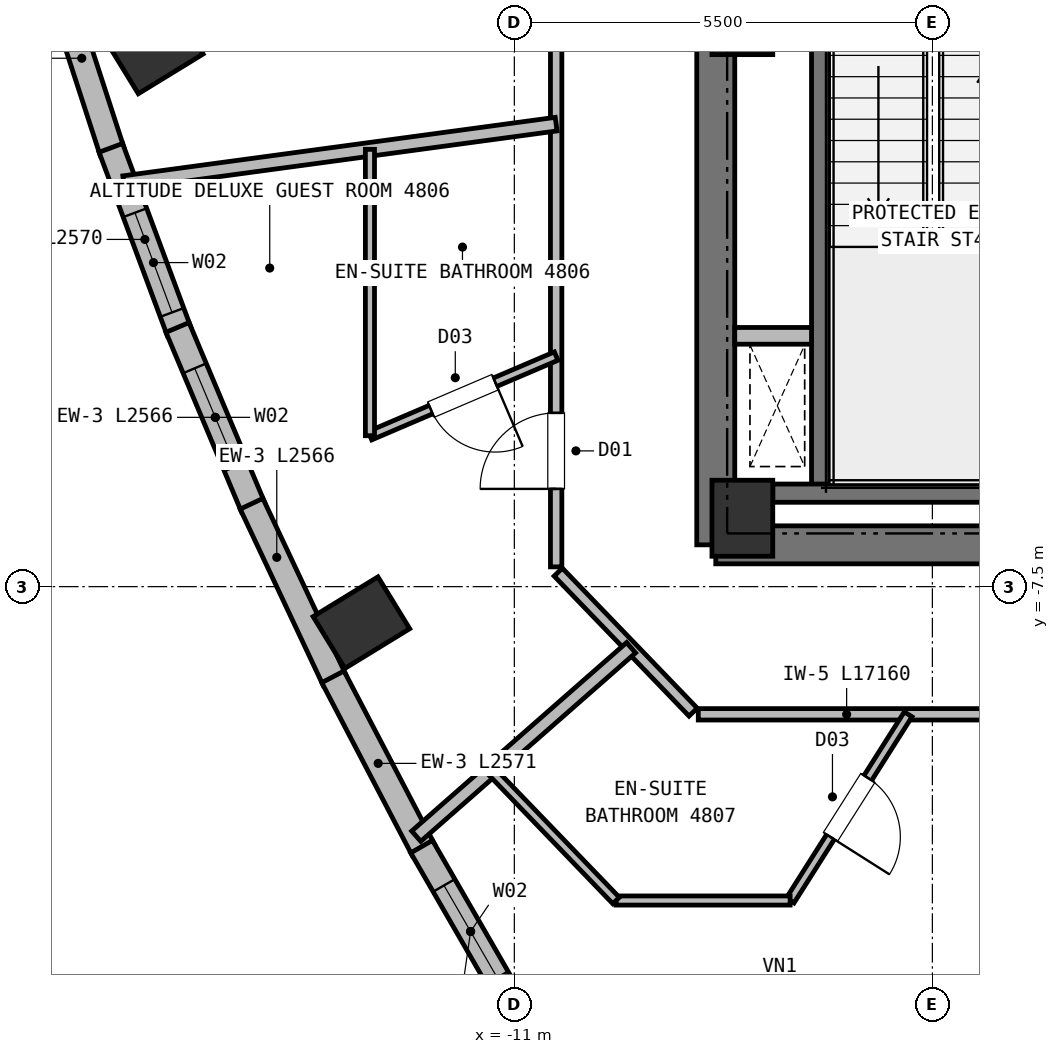
"""IFC4 building model, lengths in metres.
Left out: names, types, materials, properties, quantities, classifications, styles, units other than length and angle.
Written with IfcOpenShell. Run it as: python <this file> out.ifc"""

import sys

from ifc_helpers import new_model, si_unit, direction, frame, frame_2d, origin, origin_2d, place, context, subcontext, project, spatial, rectangle, extrude, element, fill, save


model = new_model("IFC4")
c1 = context("Model", 3, precision=1e-05, world=origin(), true_north=direction((0.0, 1.0)))
c2 = subcontext(c1, "Body", "Model", "MODEL_VIEW")
j1 = project(units=[si_unit("LENGTHUNIT", "METRE"), si_unit("PLANEANGLEUNIT", "RADIAN")], contexts=[c1])
p1 = place(None, origin())
s1 = spatial("IfcSite", under=j1, at=p1, CompositionType="ELEMENT")
p2 = place(p1, origin())
s2 = spatial("IfcBuilding", under=s1, at=p2, CompositionType="ELEMENT")
p3 = place(p2, frame((0.0, 0.0, 182.75)))
s3 = spatial("IfcBuildingStorey", under=s2, at=p3, CompositionType="ELEMENT", Elevation=182.75)
for number, where, z_axis, x_axis in (
    (1, (-8.0, -6.6, 0.0), (0.0, 0.0, 1.0), (1.0, 0.0, 0.0)),
    (2, (-8.0, 0.0, 0.0), (0.0, 0.0, 1.0), (1.0, 0.0, 0.0)),
):
    element("IfcColumn", number, at=place(p3, frame(where, z_axis=z_axis, x_axis=x_axis)), inside=s3, PredefinedType="COLUMN", context=c2, shape_type="SweptSolid", body=[
        extrude(rectangle(XDim=0.8, YDim=1.0, at=origin_2d()), origin(), (0.0, 0.0, 1.0), 3.8),
    ])
p4 = place(p3, frame((-8.35, -6.95, 0.0), z_axis=(0.0, 0.0, 1.0), x_axis=(1.0, 0.0, 0.0)))
e3 = element("IfcWall", 3, at=p4, inside=s3, PredefinedType="SHEAR", context=c2, shape_type="SweptSolid", body=[
    extrude(rectangle(XDim=3.95, YDim=0.5, at=frame_2d((1.975, 0.0))), origin(), (0.0, 0.0, 1.0), 3.55),
])
p5 = place(p3, frame((-8.35, -6.95, 0.0), z_axis=(0.0, 0.0, 1.0), x_axis=(0.0, 1.0, 0.0)))
e4 = element("IfcWall", 4, at=p5, inside=s3, PredefinedType="SHEAR", context=c2, shape_type="SweptSolid", body=[
    extrude(rectangle(XDim=8.1, YDim=0.5, at=frame_2d((4.05, 0.0))), origin(), (0.0, 0.0, 1.0), 3.55),
])
for number, where, z_axis, x_axis in (
    (5, (-15.73, -0.412, 0.0), (0.0, 0.0, 1.0), (-0.522, 0.853, 0.0)),
    (6, (-13.012, -7.974, 0.0), (0.0, 0.0, 1.0), (-0.522, 0.853, 0.0)),
):
    element("IfcColumn", number, at=place(p3, frame(where, z_axis=z_axis, x_axis=x_axis)), inside=s3, PredefinedType="COLUMN", context=c2, shape_type="SweptSolid", body=[
        extrude(rectangle(XDim=0.8, YDim=1.0, at=origin_2d()), origin(), (0.0, 0.0, 1.0), 3.8),
    ])
p6 = place(p3, frame((-16.293, -1.774, 0.0), z_axis=(0.0, 0.0, 1.0), x_axis=(-0.309148141518, 0.951013894008, 0.0)))
e7 = element("IfcWall", 7, at=p6, inside=s3, PredefinedType="SOLIDWALL", context=c2, shape_type="SweptSolid", body=[
    extrude(rectangle(XDim=2.579, YDim=0.33, at=frame_2d((1.29, 0.0))), origin(), (0.0, 0.0, 1.0), 3.55),
])
p7 = place(p3, frame((-15.413, -4.136, 0.0), z_axis=(0.0, 0.0, 1.0), x_axis=(-0.348582368666, 0.937278150954, 0.0)))
e8 = element("IfcWall", 8, at=p7, inside=s3, PredefinedType="SOLIDWALL", context=c2, shape_type="SweptSolid", body=[
    extrude(rectangle(XDim=2.57, YDim=0.33, at=frame_2d((1.285, 0.0))), origin(), (0.0, 0.0, 1.0), 3.55),
])
p8 = place(p7, frame((0.26, 0.0, 0.72)))
e9 = element("IfcOpeningElement", 9, at=p8, cuts=e8, PredefinedType="OPENING", context=c2, shape_type="SweptSolid", body=[
    extrude(rectangle(XDim=1.4, YDim=1.84, at=frame_2d((0.7, 0.92))), frame((0.0, 0.175, 0.0), z_axis=(0.0, -1.0, 0.0), x_axis=(1.0, 0.0, 0.0)), (0.0, 0.0, 1.0), 0.35),
])
p9 = place(p3, frame((-14.437, -6.455, 0.0), z_axis=(0.0, 0.0, 1.0), x_axis=(-0.387525243304, 0.921859092162, 0.0)))
e10 = element("IfcWall", 10, at=p9, inside=s3, PredefinedType="SOLIDWALL", context=c2, shape_type="SweptSolid", body=[
    extrude(rectangle(XDim=2.566, YDim=0.33, at=frame_2d((1.283, 0.0))), origin(), (0.0, 0.0, 1.0), 3.55),
])
p10 = place(p9, frame((0.583, 0.0, 0.72)))
e11 = element("IfcOpeningElement", 11, at=p10, cuts=e10, PredefinedType="OPENING", context=c2, shape_type="SweptSolid", body=[
    extrude(rectangle(XDim=1.4, YDim=1.84, at=frame_2d((0.7, 0.92))), frame((0.0, 0.175, 0.0), z_axis=(0.0, -1.0, 0.0), x_axis=(1.0, 0.0, 0.0)), (0.0, 0.0, 1.0), 0.35),
])
p11 = place(p3, frame((-13.365, -8.731, 0.0), z_axis=(0.0, 0.0, 1.0), x_axis=(-0.425774125911, 0.90482948322, 0.0)))
e12 = element("IfcWall", 12, at=p11, inside=s3, PredefinedType="SOLIDWALL", context=c2, shape_type="SweptSolid", body=[
    extrude(rectangle(XDim=2.566, YDim=0.33, at=frame_2d((1.283, 0.0))), origin(), (0.0, 0.0, 1.0), 3.55),
])
p12 = place(p3, frame((-12.196, -10.965, 0.0), z_axis=(0.0, 0.0, 1.0), x_axis=(-0.463361004434, 0.886169611062, 0.0)))
e13 = element("IfcWall", 13, at=p12, inside=s3, PredefinedType="SOLIDWALL", context=c2, shape_type="SweptSolid", body=[
    extrude(rectangle(XDim=2.571, YDim=0.33, at=frame_2d((1.285, 0.0))), origin(), (0.0, 0.0, 1.0), 3.55),
])
p13 = place(p3, frame((-10.931, -13.155, 0.0), z_axis=(0.0, 0.0, 1.0), x_axis=(-0.499875407217, 0.866097325513, 0.0)))
e14 = element("IfcWall", 14, at=p13, inside=s3, PredefinedType="SOLIDWALL", context=c2, shape_type="SweptSolid", body=[
    extrude(rectangle(XDim=2.579, YDim=0.33, at=frame_2d((1.29, 0.0))), origin(), (0.0, 0.0, 1.0), 3.55),
])
p14 = place(p13, frame((0.59, 0.0, 0.72)))
e15 = element("IfcOpeningElement", 15, at=p14, cuts=e14, PredefinedType="OPENING", context=c2, shape_type="SweptSolid", body=[
    extrude(rectangle(XDim=1.4, YDim=1.84, at=frame_2d((0.7, 0.92))), frame((0.0, 0.175, 0.0), z_axis=(0.0, -1.0, 0.0), x_axis=(1.0, 0.0, 0.0)), (0.0, 0.0, 1.0), 0.35),
])
p15 = place(p3, frame((-6.97, -6.16, 0.0), z_axis=(0.0, 0.0, 1.0), x_axis=(0.0, 1.0, 0.0)))
e16 = element("IfcWall", 16, at=p15, inside=s3, PredefinedType="SHEAR", context=c2, shape_type="SweptSolid", body=[
    extrude(rectangle(XDim=7.22, YDim=0.24, at=frame_2d((3.61, 0.0))), origin(), (0.0, 0.0, 1.0), 3.55),
])
p16 = place(p3, frame((-7.6, -6.27, 0.0), z_axis=(0.0, 0.0, 1.0), x_axis=(1.0, 0.0, 0.0)))
e17 = element("IfcWall", 17, at=p16, inside=s3, PredefinedType="SHEAR", context=c2, shape_type="SweptSolid", body=[
    extrude(rectangle(XDim=3.59, YDim=0.24, at=frame_2d((1.795, 0.0))), origin(), (0.0, 0.0, 1.0), 3.55),
])
p17 = place(p3, frame((-8.1, -4.2, 0.0), z_axis=(0.0, 0.0, 1.0), x_axis=(1.0, 0.0, 0.0)))
e18 = element("IfcWall", 18, at=p17, inside=s3, PredefinedType="PARTITIONING", context=c2, shape_type="SweptSolid", body=[
    extrude(rectangle(XDim=1.01, YDim=0.22, at=frame_2d((0.505, 0.0))), origin(), (0.0, 0.0, 1.0), 3.55),
])
p18 = place(p3, frame((8.58, -9.18, 0.0), z_axis=(0.0, 0.0, 1.0), x_axis=(-1.0, 0.0, 0.0)))
e19 = element("IfcWall", 19, at=p18, inside=s3, PredefinedType="PARTITIONING", context=c2, shape_type="SweptSolid", body=[
    extrude(rectangle(XDim=17.16, YDim=0.15, at=frame_2d((8.58, 0.0))), origin(), (0.0, 0.0, 1.0), 3.23),
])
p19 = place(p18, frame((2.444, 0.0, 0.0)))
e20 = element("IfcOpeningElement", 20, at=p19, cuts=e19, PredefinedType="OPENING", context=c2, shape_type="SweptSolid", body=[
    extrude(rectangle(XDim=0.95, YDim=2.1, at=frame_2d((0.475, 1.05))), frame((0.0, 0.085, 0.0), z_axis=(0.0, -1.0, 0.0), x_axis=(1.0, 0.0, 0.0)), (0.0, 0.0, 1.0), 0.17),
])
p20 = place(p18, frame((4.798, 0.0, 0.0)))
e21 = element("IfcOpeningElement", 21, at=p20, cuts=e19, PredefinedType="OPENING", context=c2, shape_type="SweptSolid", body=[
    extrude(rectangle(XDim=1.0, YDim=2.15, at=frame_2d((0.5, 1.075))), frame((0.0, 0.085, 0.0), z_axis=(0.0, -1.0, 0.0), x_axis=(1.0, 0.0, 0.0)), (0.0, 0.0, 1.0), 0.17),
])
p21 = place(p18, frame((12.096, 0.0, 0.0)))
e22 = element("IfcOpeningElement", 22, at=p21, cuts=e19, PredefinedType="OPENING", context=c2, shape_type="SweptSolid", body=[
    extrude(rectangle(XDim=1.06, YDim=2.15, at=frame_2d((0.53, 1.075))), frame((0.0, 0.085, 0.0), z_axis=(0.0, -1.0, 0.0), x_axis=(1.0, 0.0, 0.0)), (0.0, 0.0, 1.0), 0.17),
])
p22 = place(p18, frame((8.137, 0.0, 0.0)))
e23 = element("IfcOpeningElement", 23, at=p22, cuts=e19, PredefinedType="OPENING", context=c2, shape_type="SweptSolid", body=[
    extrude(rectangle(XDim=1.0, YDim=2.15, at=frame_2d((0.5, 1.075))), frame((0.0, 0.085, 0.0), z_axis=(0.0, -1.0, 0.0), x_axis=(1.0, 0.0, 0.0)), (0.0, 0.0, 1.0), 0.17),
])
p23 = place(p3, frame((-10.45, -7.24, 0.0), z_axis=(0.0, 0.0, 1.0), x_axis=(0.0, 1.0, 0.0)))
e24 = element("IfcWall", 24, at=p23, inside=s3, PredefinedType="PARTITIONING", context=c2, shape_type="SweptSolid", body=[
    extrude(rectangle(XDim=14.48, YDim=0.15, at=frame_2d((7.24, 0.0))), origin(), (0.0, 0.0, 1.0), 3.55),
])
p24 = place(p23, frame((1.026, 0.0, 0.0)))
e25 = element("IfcOpeningElement", 25, at=p24, cuts=e24, PredefinedType="OPENING", context=c2, shape_type="SweptSolid", body=[
    extrude(rectangle(XDim=1.0, YDim=2.15, at=frame_2d((0.5, 1.075))), frame((0.0, 0.085, 0.0), z_axis=(0.0, -1.0, 0.0), x_axis=(1.0, 0.0, 0.0)), (0.0, 0.0, 1.0), 0.17),
])
p25 = place(p23, frame((7.126, 0.0, 0.0)))
e26 = element("IfcOpeningElement", 26, at=p25, cuts=e24, PredefinedType="OPENING", context=c2, shape_type="SweptSolid", body=[
    extrude(rectangle(XDim=1.06, YDim=2.15, at=frame_2d((0.53, 1.075))), frame((0.0, 0.085, 0.0), z_axis=(0.0, -1.0, 0.0), x_axis=(1.0, 0.0, 0.0)), (0.0, 0.0, 1.0), 0.17),
])
p26 = place(p3, frame((-8.648, -9.151, 0.0), z_axis=(0.0, 0.0, 1.0), x_axis=(-0.693764562202, 0.720201869085, 0.0)))
e27 = element("IfcWall", 27, at=p26, inside=s3, PredefinedType="PARTITIONING", context=c2, shape_type="SweptSolid", body=[
    extrude(rectangle(XDim=2.558, YDim=0.15, at=frame_2d((1.279, 0.0))), origin(), (0.0, 0.0, 1.0), 3.23),
])
p27 = place(p3, frame((-10.45, -1.415, 0.0), z_axis=(0.0, 0.0, 1.0), x_axis=(-0.990963730959, -0.13413010074, 0.0)))
e28 = element("IfcWall", 28, at=p27, inside=s3, PredefinedType="PARTITIONING", context=c2, shape_type="SweptSolid", body=[
    extrude(rectangle(XDim=5.741, YDim=0.18, at=frame_2d((2.87, 0.0))), origin(), (0.0, 0.0, 1.0), 3.55),
])
p28 = place(p3, frame((-10.45, -4.467, 0.0), z_axis=(0.0, 0.0, 1.0), x_axis=(-0.919533231313, -0.39301226, 0.0)))
e29 = element("IfcWall", 29, at=p28, inside=s3, PredefinedType="PARTITIONING", context=c2, shape_type="SweptSolid", body=[
    extrude(rectangle(XDim=2.664, YDim=0.12, at=frame_2d((1.332, 0.0))), origin(), (0.0, 0.0, 1.0), 3.55),
])
p29 = place(p28, frame((0.872, 0.0, 0.0)))
e30 = element("IfcOpeningElement", 30, at=p29, cuts=e29, PredefinedType="OPENING", context=c2, shape_type="SweptSolid", body=[
    extrude(rectangle(XDim=0.92, YDim=2.1, at=frame_2d((0.46, 1.05))), frame((0.0, 0.07, 0.0), z_axis=(0.0, -1.0, 0.0), x_axis=(1.0, 0.0, 0.0)), (0.0, 0.0, 1.0), 0.14),
])
p30 = place(p3, frame((-12.9, -1.746, 0.0), z_axis=(0.0, 0.0, 1.0), x_axis=(0.0, -1.0, 0.0)))
e31 = element("IfcWall", 31, at=p30, inside=s3, PredefinedType="PARTITIONING", context=c2, shape_type="SweptSolid", body=[
    extrude(rectangle(XDim=3.768, YDim=0.12, at=frame_2d((1.884, 0.0))), origin(), (0.0, 0.0, 1.0), 3.23),
])
p31 = place(p3, frame((-9.464, -8.304, 0.0), z_axis=(0.0, 0.0, 1.0), x_axis=(-0.751699255643, -0.659506049302, 0.0)))
e32 = element("IfcWall", 32, at=p31, inside=s3, PredefinedType="PARTITIONING", context=c2, shape_type="SweptSolid", body=[
    extrude(rectangle(XDim=3.76, YDim=0.18, at=frame_2d((1.88, 0.0))), origin(), (0.0, 0.0, 1.0), 3.55),
])
p32 = place(p3, frame((-5.819, -9.18, 0.0), z_axis=(0.0, 0.0, 1.0), x_axis=(-0.535382431743, -0.844609763015, 0.0)))
e33 = element("IfcWall", 33, at=p32, inside=s3, PredefinedType="PARTITIONING", context=c2, shape_type="SweptSolid", body=[
    extrude(rectangle(XDim=2.901, YDim=0.12, at=frame_2d((1.45, 0.0))), origin(), (0.0, 0.0, 1.0), 3.55),
])
p33 = place(p32, frame((0.99, 0.0, 0.0)))
e34 = element("IfcOpeningElement", 34, at=p33, cuts=e33, PredefinedType="OPENING", context=c2, shape_type="SweptSolid", body=[
    extrude(rectangle(XDim=0.92, YDim=2.1, at=frame_2d((0.46, 1.05))), frame((0.0, 0.07, 0.0), z_axis=(0.0, -1.0, 0.0), x_axis=(1.0, 0.0, 0.0)), (0.0, 0.0, 1.0), 0.14),
])
p34 = place(p3, frame((-7.372, -11.63, 0.0), z_axis=(0.0, 0.0, 1.0), x_axis=(-1.0, 0.0, 0.0)))
e35 = element("IfcWall", 35, at=p34, inside=s3, PredefinedType="PARTITIONING", context=c2, shape_type="SweptSolid", body=[
    extrude(rectangle(XDim=2.29, YDim=0.12, at=frame_2d((1.145, 0.0))), origin(), (0.0, 0.0, 1.0), 3.55),
])
p35 = place(p3, frame((-11.308, -9.921, 0.0), z_axis=(0.0, 0.0, 1.0), x_axis=(0.693706945125, -0.7202573667, 0.0)))
e36 = element("IfcWall", 36, at=p35, inside=s3, PredefinedType="PARTITIONING", context=c2, shape_type="SweptSolid", body=[
    extrude(rectangle(XDim=2.372, YDim=0.12, at=frame_2d((1.186, 0.0))), origin(), (0.0, 0.0, 1.0), 2.63),
])
p36 = place(p3, frame((-2.145, -9.18, 0.0), z_axis=(0.0, 0.0, 1.0), x_axis=(-0.22755258656, -0.973765793376, 0.0)))
e37 = element("IfcWall", 37, at=p36, inside=s3, PredefinedType="PARTITIONING", context=c2, shape_type="SweptSolid", body=[
    extrude(rectangle(XDim=12.569, YDim=0.18, at=frame_2d((6.285, 0.0))), origin(), (0.0, 0.0, 1.0), 3.55),
])
p37 = place(p8, origin())
e38 = element("IfcWindow", 38, at=p37, inside=s3, PartitioningType="SINGLE_PANEL", PredefinedType="WINDOW", context=c2, shape_type="SweptSolid", body=[
    extrude(rectangle(XDim=1.4, YDim=1.84, at=frame_2d((0.7, 0.92))), frame((0.0, 0.03, 0.0), z_axis=(0.0, -1.0, 0.0), x_axis=(1.0, 0.0, 0.0)), (0.0, 0.0, 1.0), 0.06),
])
fill(e9, e38)
p38 = place(p10, origin())
e39 = element("IfcWindow", 39, at=p38, inside=s3, PartitioningType="SINGLE_PANEL", PredefinedType="WINDOW", context=c2, shape_type="SweptSolid", body=[
    extrude(rectangle(XDim=1.4, YDim=1.84, at=frame_2d((0.7, 0.92))), frame((0.0, 0.03, 0.0), z_axis=(0.0, -1.0, 0.0), x_axis=(1.0, 0.0, 0.0)), (0.0, 0.0, 1.0), 0.06),
])
fill(e11, e39)
p39 = place(p14, origin())
e40 = element("IfcWindow", 40, at=p39, inside=s3, PartitioningType="SINGLE_PANEL", PredefinedType="WINDOW", context=c2, shape_type="SweptSolid", body=[
    extrude(rectangle(XDim=1.4, YDim=1.84, at=frame_2d((0.7, 0.92))), frame((0.0, 0.03, 0.0), z_axis=(0.0, -1.0, 0.0), x_axis=(1.0, 0.0, 0.0)), (0.0, 0.0, 1.0), 0.06),
])
fill(e15, e40)
p40 = place(p29, origin())
e41 = element("IfcDoor", 41, at=p40, inside=s3, OperationType="SINGLE_SWING_LEFT", PredefinedType="DOOR", context=c2, shape_type="SweptSolid", body=[
    extrude(rectangle(XDim=0.92, YDim=2.1, at=frame_2d((0.46, 1.05))), frame((0.0, 0.025, 0.0), z_axis=(0.0, -1.0, 0.0), x_axis=(1.0, 0.0, 0.0)), (0.0, 0.0, 1.0), 0.05),
])
fill(e30, e41)
p41 = place(p33, origin())
e42 = element("IfcDoor", 42, at=p41, inside=s3, OperationType="SINGLE_SWING_RIGHT", PredefinedType="DOOR", context=c2, shape_type="SweptSolid", body=[
    extrude(rectangle(XDim=0.92, YDim=2.1, at=frame_2d((0.46, 1.05))), frame((0.0, 0.025, 0.0), z_axis=(0.0, -1.0, 0.0), x_axis=(1.0, 0.0, 0.0)), (0.0, 0.0, 1.0), 0.05),
])
fill(e34, e42)
p42 = place(p24, origin())
e43 = element("IfcDoor", 43, at=p42, inside=s3, OperationType="SINGLE_SWING_LEFT", PredefinedType="DOOR", context=c2, shape_type="SweptSolid", body=[
    extrude(rectangle(XDim=1.0, YDim=2.15, at=frame_2d((0.5, 1.075))), frame((0.0, 0.025, 0.0), z_axis=(0.0, -1.0, 0.0), x_axis=(1.0, 0.0, 0.0)), (0.0, 0.0, 1.0), 0.05),
])
fill(e25, e43)
save(model, sys.argv[1])
